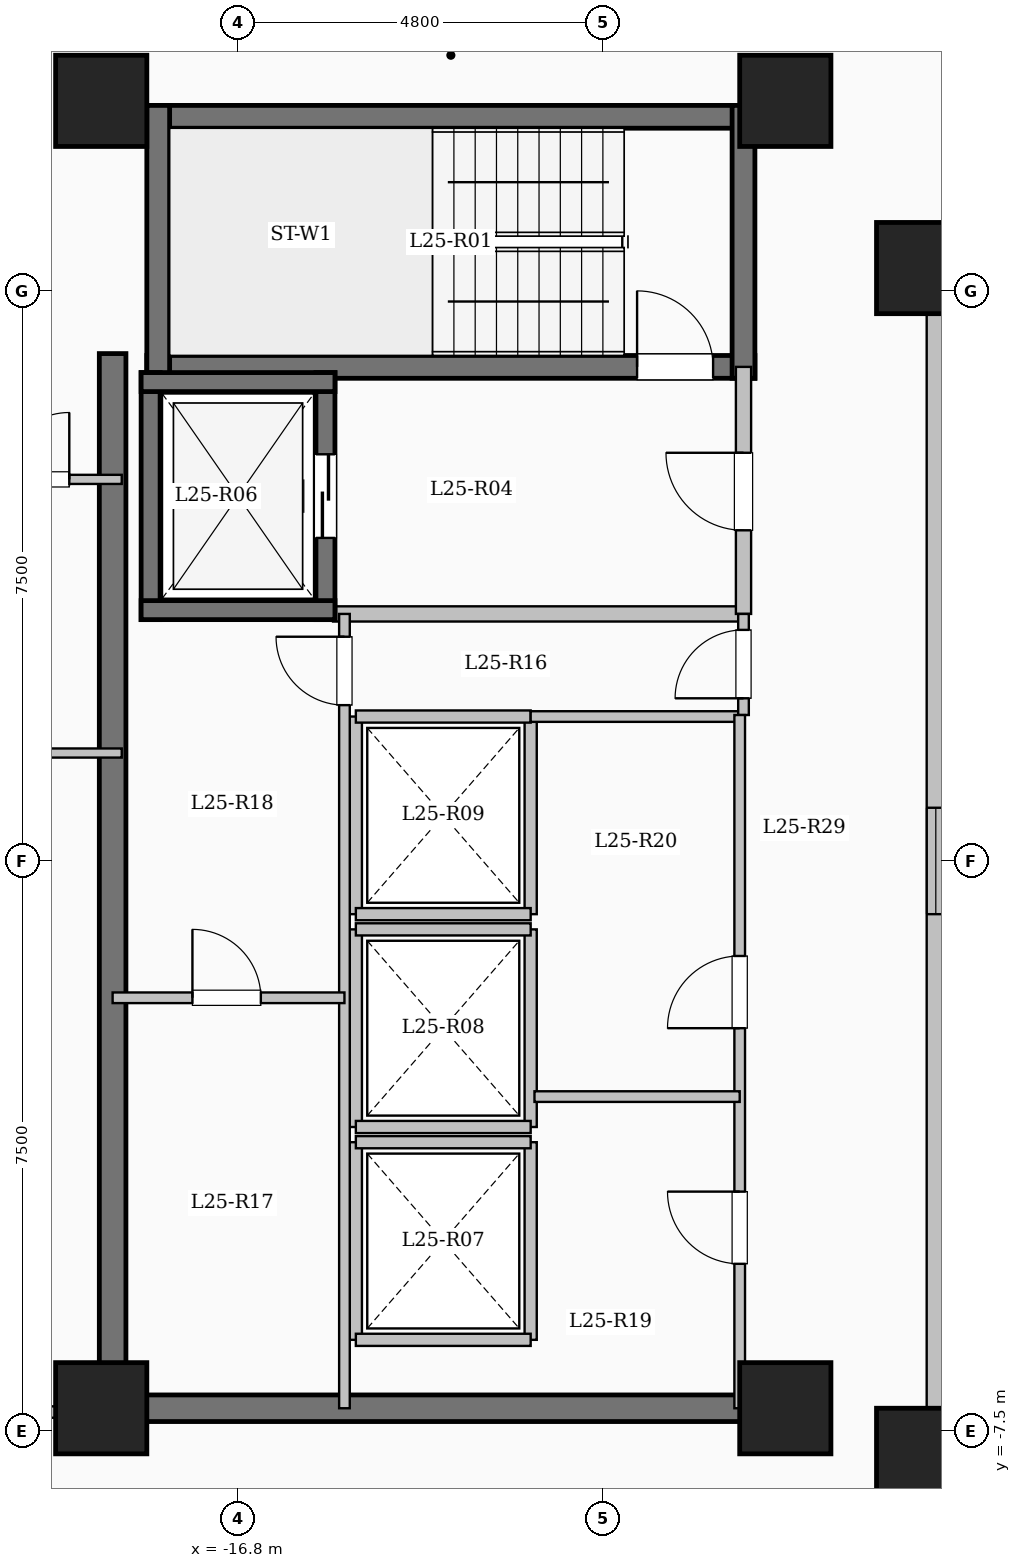
"""IFC4 building model, lengths in metres.
Left out: names, types, materials, properties, quantities, classifications, styles, units other than length and angle.
Written with IfcOpenShell. Run it as: python <this file> out.ifc"""

import sys

from ifc_helpers import new_model, si_unit, direction, frame, frame_2d, origin, origin_2d, place, context, subcontext, project, spatial, rectangle, extrude, element, fill, save


model = new_model("IFC4")
c1 = context("Model", 3, precision=1e-05, world=origin(), true_north=direction((0.0, 1.0)))
c2 = subcontext(c1, "Body", "Model", "MODEL_VIEW")
j1 = project(units=[si_unit("LENGTHUNIT", "METRE"), si_unit("PLANEANGLEUNIT", "RADIAN")], contexts=[c1])
p1 = place(None, origin())
s1 = spatial("IfcSite", under=j1, at=p1, CompositionType="ELEMENT")
p2 = place(p1, origin())
s2 = spatial("IfcBuilding", under=s1, at=p2, CompositionType="ELEMENT")
p3 = place(p2, frame((0.0, 0.0, 95.05)))
s3 = spatial("IfcBuildingStorey", under=s2, at=p3, CompositionType="ELEMENT", Elevation=95.05)
for number, where, z_axis, x_axis in (
    (1, (-7.8, -7.8, 0.0), (0.0, 0.0, 1.0), (1.0, 0.0, 0.0)),
    (2, (-7.8, 7.8, 0.0), (0.0, 0.0, 1.0), (1.0, 0.0, 0.0)),
    (3, (-9.6, -7.2, 0.0), (0.0, 0.0, 1.0), (1.0, 0.0, 0.0)),
    (4, (-9.6, 10.0, 0.0), (0.0, 0.0, 1.0), (1.0, 0.0, 0.0)),
    (5, (-18.6, -7.2, 0.0), (0.0, 0.0, 1.0), (1.0, 0.0, 0.0)),
    (6, (-18.6, 10.0, 0.0), (0.0, 0.0, 1.0), (1.0, 0.0, 0.0)),
):
    element("IfcColumn", number, at=place(p3, frame(where, z_axis=z_axis, x_axis=x_axis)), inside=s3, PredefinedType="COLUMN", context=c2, shape_type="SweptSolid", body=[
        extrude(rectangle(XDim=1.2, YDim=1.2, at=origin_2d()), origin(), (0.0, 0.0, 1.0), 3.35),
    ])
p4 = place(p3, frame((-7.62, -7.62, 0.0), z_axis=(0.0, 0.0, 1.0), x_axis=(1.0, 0.0, 0.0)))
e7 = element("IfcWall", 7, at=p4, inside=s3, PredefinedType="SOLIDWALL", context=c2, shape_type="SweptSolid", body=[
    extrude(rectangle(XDim=15.24, YDim=0.24, at=frame_2d((7.62, 0.0))), origin(), (0.0, 0.0, 1.0), 3.1),
])
p5 = place(p4, frame((6.92, 0.0, 0.95)))
e8 = element("IfcOpeningElement", 8, at=p5, cuts=e7, PredefinedType="OPENING", context=c2, shape_type="SweptSolid", body=[
    extrude(rectangle(XDim=1.4, YDim=1.5, at=frame_2d((0.7, 0.75))), frame((0.0, 0.13, 0.0), z_axis=(0.0, -1.0, 0.0), x_axis=(1.0, 0.0, 0.0)), (0.0, 0.0, 1.0), 0.26),
])
p6 = place(p3, frame((7.62, 7.62, 0.0), z_axis=(0.0, 0.0, 1.0), x_axis=(-1.0, 0.0, 0.0)))
e9 = element("IfcWall", 9, at=p6, inside=s3, PredefinedType="SOLIDWALL", context=c2, shape_type="SweptSolid", body=[
    extrude(rectangle(XDim=15.24, YDim=0.24, at=frame_2d((7.62, 0.0))), origin(), (0.0, 0.0, 1.0), 3.1),
])
p7 = place(p6, frame((6.92, 0.0, 0.95)))
e10 = element("IfcOpeningElement", 10, at=p7, cuts=e9, PredefinedType="OPENING", context=c2, shape_type="SweptSolid", body=[
    extrude(rectangle(XDim=1.4, YDim=1.5, at=frame_2d((0.7, 0.75))), frame((0.0, 0.13, 0.0), z_axis=(0.0, -1.0, 0.0), x_axis=(1.0, 0.0, 0.0)), (0.0, 0.0, 1.0), 0.26),
])
p8 = place(p3, frame((-7.62, 7.62, 0.0), z_axis=(0.0, 0.0, 1.0), x_axis=(0.0, -1.0, 0.0)))
e11 = element("IfcWall", 11, at=p8, inside=s3, PredefinedType="SOLIDWALL", context=c2, shape_type="SweptSolid", body=[
    extrude(rectangle(XDim=15.24, YDim=0.24, at=frame_2d((7.62, 0.0))), origin(), (0.0, 0.0, 1.0), 3.1),
])
p9 = place(p8, frame((6.92, 0.0, 0.95)))
e12 = element("IfcOpeningElement", 12, at=p9, cuts=e11, PredefinedType="OPENING", context=c2, shape_type="SweptSolid", body=[
    extrude(rectangle(XDim=1.4, YDim=1.5, at=frame_2d((0.7, 0.75))), frame((0.0, 0.13, 0.0), z_axis=(0.0, -1.0, 0.0), x_axis=(1.0, 0.0, 0.0)), (0.0, 0.0, 1.0), 0.26),
])
p10 = place(p3, frame((-18.0, 9.79, 0.0), z_axis=(0.0, 0.0, 1.0), x_axis=(1.0, 0.0, 0.0)))
e13 = element("IfcWall", 13, at=p10, inside=s3, PredefinedType="SHEAR", context=c2, shape_type="SweptSolid", body=[
    extrude(rectangle(XDim=8.0, YDim=0.3, at=frame_2d((4.0, 0.0))), origin(), (0.0, 0.0, 1.0), 3.35),
])
p11 = place(p3, frame((-18.0, 6.5, 0.0), z_axis=(0.0, 0.0, 1.0), x_axis=(1.0, 0.0, 0.0)))
e14 = element("IfcWall", 14, at=p11, inside=s3, PredefinedType="SHEAR", context=c2, shape_type="SweptSolid", body=[
    extrude(rectangle(XDim=8.0, YDim=0.3, at=frame_2d((4.0, 0.0))), origin(), (0.0, 0.0, 1.0), 3.35),
])
p12 = place(p11, frame((6.45, 0.0, 0.0)))
e15 = element("IfcOpeningElement", 15, at=p12, cuts=e14, PredefinedType="OPENING", context=c2, shape_type="SweptSolid", body=[
    extrude(rectangle(XDim=1.0, YDim=2.15, at=frame_2d((0.5, 1.075))), frame((0.0, 0.16, 0.0), z_axis=(0.0, -1.0, 0.0), x_axis=(1.0, 0.0, 0.0)), (0.0, 0.0, 1.0), 0.32),
])
for number, where, z_axis, x_axis in (
    (16, (-17.85, 6.35, 0.0), (0.0, 0.0, 1.0), (0.0, 1.0, 0.0)),
    (17, (-10.15, 6.35, 0.0), (0.0, 0.0, 1.0), (0.0, 1.0, 0.0)),
):
    element("IfcWall", number, at=place(p3, frame(where, z_axis=z_axis, x_axis=x_axis)), inside=s3, PredefinedType="SHEAR", context=c2, shape_type="SweptSolid", body=[
        extrude(rectangle(XDim=3.59, YDim=0.3, at=frame_2d((1.795, 0.0))), origin(), (0.0, 0.0, 1.0), 3.35),
    ])
p13 = place(p3, frame((-15.55, 3.25, 0.0), z_axis=(0.0, 0.0, 1.0), x_axis=(1.0, 0.0, 0.0)))
e18 = element("IfcWall", 18, at=p13, inside=s3, PredefinedType="SOLIDWALL", context=c2, shape_type="SweptSolid", body=[
    extrude(rectangle(XDim=5.4, YDim=0.2, at=frame_2d((2.7, 0.0))), origin(), (0.0, 0.0, 1.0), 3.1),
])
p14 = place(p3, frame((-10.15, 3.25, 0.0), z_axis=(0.0, 0.0, 1.0), x_axis=(0.0, 1.0, 0.0)))
e19 = element("IfcWall", 19, at=p14, inside=s3, PredefinedType="SOLIDWALL", context=c2, shape_type="SweptSolid", body=[
    extrude(rectangle(XDim=3.25, YDim=0.2, at=frame_2d((1.625, 0.0))), origin(), (0.0, 0.0, 1.0), 3.1),
])
p15 = place(p14, frame((1.1, 0.0, 0.0)))
e20 = element("IfcOpeningElement", 20, at=p15, cuts=e19, PredefinedType="OPENING", context=c2, shape_type="SweptSolid", body=[
    extrude(rectangle(XDim=1.02, YDim=2.15, at=frame_2d((0.51, 1.075))), frame((0.0, 0.11, 0.0), z_axis=(0.0, -1.0, 0.0), x_axis=(1.0, 0.0, 0.0)), (0.0, 0.0, 1.0), 0.22),
])
p16 = place(p3, frame((-17.95, 3.175, 0.0), z_axis=(0.0, 0.0, 1.0), x_axis=(0.0, 1.0, 0.0)))
e21 = element("IfcWall", 21, at=p16, inside=s3, PredefinedType="SHEAR", context=c2, shape_type="SweptSolid", body=[
    extrude(rectangle(XDim=3.25, YDim=0.25, at=frame_2d((1.625, 0.0))), origin(), (0.0, 0.0, 1.0), 3.35),
])
p17 = place(p3, frame((-15.65, 3.175, 0.0), z_axis=(0.0, 0.0, 1.0), x_axis=(0.0, 1.0, 0.0)))
e22 = element("IfcWall", 22, at=p17, inside=s3, PredefinedType="SHEAR", context=c2, shape_type="SweptSolid", body=[
    extrude(rectangle(XDim=3.25, YDim=0.25, at=frame_2d((1.625, 0.0))), origin(), (0.0, 0.0, 1.0), 3.35),
])
p18 = place(p17, frame((1.075, 0.0, 0.0)))
e23 = element("IfcOpeningElement", 23, at=p18, cuts=e22, PredefinedType="OPENING", context=c2, shape_type="SweptSolid", body=[
    extrude(rectangle(XDim=1.1, YDim=2.15, at=frame_2d((0.55, 1.075))), frame((0.0, 0.135, 0.0), z_axis=(0.0, -1.0, 0.0), x_axis=(1.0, 0.0, 0.0)), (0.0, 0.0, 1.0), 0.27),
])
for number, where, z_axis, x_axis in (
    (24, (-18.075, 3.3, 0.0), (0.0, 0.0, 1.0), (1.0, 0.0, 0.0)),
    (25, (-18.075, 6.3, 0.0), (0.0, 0.0, 1.0), (1.0, 0.0, 0.0)),
):
    element("IfcWall", number, at=place(p3, frame(where, z_axis=z_axis, x_axis=x_axis)), inside=s3, PredefinedType="SHEAR", context=c2, shape_type="SweptSolid", body=[
        extrude(rectangle(XDim=2.55, YDim=0.25, at=frame_2d((1.275, 0.0))), origin(), (0.0, 0.0, 1.0), 3.35),
    ])
for number, where, z_axis, x_axis in (
    (26, (-15.25, -6.3, 0.0), (0.0, 0.0, 1.0), (0.0, 1.0, 0.0)),
    (27, (-12.95, -6.3, 0.0), (0.0, 0.0, 1.0), (0.0, 1.0, 0.0)),
):
    element("IfcWall", number, at=place(p3, frame(where, z_axis=z_axis, x_axis=x_axis)), inside=s3, PredefinedType="SOLIDWALL", context=c2, shape_type="SweptSolid", body=[
        extrude(rectangle(XDim=2.6, YDim=0.16, at=frame_2d((1.3, 0.0))), origin(), (0.0, 0.0, 1.0), 3.1),
    ])
for number, where, z_axis, x_axis in (
    (28, (-15.25, -6.3, 0.0), (0.0, 0.0, 1.0), (1.0, 0.0, 0.0)),
    (29, (-15.25, -3.7, 0.0), (0.0, 0.0, 1.0), (1.0, 0.0, 0.0)),
):
    element("IfcWall", number, at=place(p3, frame(where, z_axis=z_axis, x_axis=x_axis)), inside=s3, PredefinedType="SOLIDWALL", context=c2, shape_type="SweptSolid", body=[
        extrude(rectangle(XDim=2.3, YDim=0.16, at=frame_2d((1.15, 0.0))), origin(), (0.0, 0.0, 1.0), 3.1),
    ])
for number, where, z_axis, x_axis in (
    (30, (-15.25, -3.5, 0.0), (0.0, 0.0, 1.0), (0.0, 1.0, 0.0)),
    (31, (-12.95, -3.5, 0.0), (0.0, 0.0, 1.0), (0.0, 1.0, 0.0)),
):
    element("IfcWall", number, at=place(p3, frame(where, z_axis=z_axis, x_axis=x_axis)), inside=s3, PredefinedType="SOLIDWALL", context=c2, shape_type="SweptSolid", body=[
        extrude(rectangle(XDim=2.6, YDim=0.16, at=frame_2d((1.3, 0.0))), origin(), (0.0, 0.0, 1.0), 3.1),
    ])
for number, where, z_axis, x_axis in (
    (32, (-15.25, -3.5, 0.0), (0.0, 0.0, 1.0), (1.0, 0.0, 0.0)),
    (33, (-15.25, -0.9, 0.0), (0.0, 0.0, 1.0), (1.0, 0.0, 0.0)),
):
    element("IfcWall", number, at=place(p3, frame(where, z_axis=z_axis, x_axis=x_axis)), inside=s3, PredefinedType="SOLIDWALL", context=c2, shape_type="SweptSolid", body=[
        extrude(rectangle(XDim=2.3, YDim=0.16, at=frame_2d((1.15, 0.0))), origin(), (0.0, 0.0, 1.0), 3.1),
    ])
for number, where, z_axis, x_axis in (
    (34, (-15.25, -0.7, 0.0), (0.0, 0.0, 1.0), (0.0, 1.0, 0.0)),
    (35, (-12.95, -0.7, 0.0), (0.0, 0.0, 1.0), (0.0, 1.0, 0.0)),
):
    element("IfcWall", number, at=place(p3, frame(where, z_axis=z_axis, x_axis=x_axis)), inside=s3, PredefinedType="SOLIDWALL", context=c2, shape_type="SweptSolid", body=[
        extrude(rectangle(XDim=2.6, YDim=0.16, at=frame_2d((1.3, 0.0))), origin(), (0.0, 0.0, 1.0), 3.1),
    ])
for number, where, z_axis, x_axis in (
    (36, (-15.25, -0.7, 0.0), (0.0, 0.0, 1.0), (1.0, 0.0, 0.0)),
    (37, (-15.25, 1.9, 0.0), (0.0, 0.0, 1.0), (1.0, 0.0, 0.0)),
):
    element("IfcWall", number, at=place(p3, frame(where, z_axis=z_axis, x_axis=x_axis)), inside=s3, PredefinedType="SOLIDWALL", context=c2, shape_type="SweptSolid", body=[
        extrude(rectangle(XDim=2.3, YDim=0.16, at=frame_2d((1.15, 0.0))), origin(), (0.0, 0.0, 1.0), 3.1),
    ])
p19 = place(p3, frame((-18.45, -7.375, 0.0), z_axis=(0.0, 0.0, 1.0), x_axis=(0.0, 1.0, 0.0)))
e38 = element("IfcWall", 38, at=p19, inside=s3, PredefinedType="SHEAR", context=c2, shape_type="SweptSolid", body=[
    extrude(rectangle(XDim=14.05, YDim=0.35, at=frame_2d((7.025, 0.0))), origin(), (0.0, 0.0, 1.0), 3.35),
])
p20 = place(p3, frame((-18.625, -7.2, 0.0), z_axis=(0.0, 0.0, 1.0), x_axis=(1.0, 0.0, 0.0)))
e39 = element("IfcWall", 39, at=p20, inside=s3, PredefinedType="SHEAR", context=c2, shape_type="SweptSolid", body=[
    extrude(rectangle(XDim=8.55, YDim=0.35, at=frame_2d((4.275, 0.0))), origin(), (0.0, 0.0, 1.0), 3.35),
])
p21 = place(p3, frame((-12.95, 1.9, 0.0), z_axis=(0.0, 0.0, 1.0), x_axis=(1.0, 0.0, 0.0)))
e40 = element("IfcWall", 40, at=p21, inside=s3, PredefinedType="PARTITIONING", context=c2, shape_type="SweptSolid", body=[
    extrude(rectangle(XDim=2.8, YDim=0.14, at=frame_2d((1.4, 0.0))), origin(), (0.0, 0.0, 1.0), 3.1),
])
p22 = place(p3, frame((-10.15, 1.92, 0.0), z_axis=(0.0, 0.0, 1.0), x_axis=(0.0, 1.0, 0.0)))
e41 = element("IfcWall", 41, at=p22, inside=s3, PredefinedType="PARTITIONING", context=c2, shape_type="SweptSolid", body=[
    extrude(rectangle(XDim=1.33, YDim=0.14, at=frame_2d((0.665, 0.0))), origin(), (0.0, 0.0, 1.0), 3.1),
])
p23 = place(p22, frame((0.22, 0.0, 0.0)))
e42 = element("IfcOpeningElement", 42, at=p23, cuts=e41, PredefinedType="OPENING", context=c2, shape_type="SweptSolid", body=[
    extrude(rectangle(XDim=0.9, YDim=2.08, at=frame_2d((0.45, 1.04))), frame((0.0, 0.08, 0.0), z_axis=(0.0, -1.0, 0.0), x_axis=(1.0, 0.0, 0.0)), (0.0, 0.0, 1.0), 0.16),
])
p24 = place(p3, frame((-15.4, -7.2, 0.0), z_axis=(0.0, 0.0, 1.0), x_axis=(0.0, 1.0, 0.0)))
e43 = element("IfcWall", 43, at=p24, inside=s3, PredefinedType="PARTITIONING", context=c2, shape_type="SweptSolid", body=[
    extrude(rectangle(XDim=10.45, YDim=0.14, at=frame_2d((5.225, 0.0))), origin(), (0.0, 0.0, 1.0), 3.1),
])
p25 = place(p24, frame((9.25, 0.0, 0.0)))
e44 = element("IfcOpeningElement", 44, at=p25, cuts=e43, PredefinedType="OPENING", context=c2, shape_type="SweptSolid", body=[
    extrude(rectangle(XDim=0.9, YDim=2.08, at=frame_2d((0.45, 1.04))), frame((0.0, 0.08, 0.0), z_axis=(0.0, -1.0, 0.0), x_axis=(1.0, 0.0, 0.0)), (0.0, 0.0, 1.0), 0.16),
])
p26 = place(p3, frame((-18.45, -1.8, 0.0), z_axis=(0.0, 0.0, 1.0), x_axis=(1.0, 0.0, 0.0)))
e45 = element("IfcWall", 45, at=p26, inside=s3, PredefinedType="PARTITIONING", context=c2, shape_type="SweptSolid", body=[
    extrude(rectangle(XDim=3.05, YDim=0.14, at=frame_2d((1.525, 0.0))), origin(), (0.0, 0.0, 1.0), 3.1),
])
p27 = place(p26, frame((1.05, 0.0, 0.0)))
e46 = element("IfcOpeningElement", 46, at=p27, cuts=e45, PredefinedType="OPENING", context=c2, shape_type="SweptSolid", body=[
    extrude(rectangle(XDim=0.9, YDim=2.08, at=frame_2d((0.45, 1.04))), frame((0.0, 0.08, 0.0), z_axis=(0.0, -1.0, 0.0), x_axis=(1.0, 0.0, 0.0)), (0.0, 0.0, 1.0), 0.16),
])
p28 = place(p3, frame((-10.2, -7.2, 0.0), z_axis=(0.0, 0.0, 1.0), x_axis=(0.0, 1.0, 0.0)))
e47 = element("IfcWall", 47, at=p28, inside=s3, PredefinedType="PARTITIONING", context=c2, shape_type="SweptSolid", body=[
    extrude(rectangle(XDim=9.12, YDim=0.14, at=frame_2d((4.56, 0.0))), origin(), (0.0, 0.0, 1.0), 3.1),
])
p29 = place(p28, frame((1.9, 0.0, 0.0)))
e48 = element("IfcOpeningElement", 48, at=p29, cuts=e47, PredefinedType="OPENING", context=c2, shape_type="SweptSolid", body=[
    extrude(rectangle(XDim=0.95, YDim=2.12, at=frame_2d((0.475, 1.06))), frame((0.0, 0.08, 0.0), z_axis=(0.0, -1.0, 0.0), x_axis=(1.0, 0.0, 0.0)), (0.0, 0.0, 1.0), 0.16),
])
p30 = place(p28, frame((5.0, 0.0, 0.0)))
e49 = element("IfcOpeningElement", 49, at=p30, cuts=e47, PredefinedType="OPENING", context=c2, shape_type="SweptSolid", body=[
    extrude(rectangle(XDim=0.95, YDim=2.12, at=frame_2d((0.475, 1.06))), frame((0.0, 0.08, 0.0), z_axis=(0.0, -1.0, 0.0), x_axis=(1.0, 0.0, 0.0)), (0.0, 0.0, 1.0), 0.16),
])
p31 = place(p3, frame((-12.9, -3.1, 0.0), z_axis=(0.0, 0.0, 1.0), x_axis=(1.0, 0.0, 0.0)))
e50 = element("IfcWall", 50, at=p31, inside=s3, PredefinedType="PARTITIONING", context=c2, shape_type="SweptSolid", body=[
    extrude(rectangle(XDim=2.7, YDim=0.14, at=frame_2d((1.35, 0.0))), origin(), (0.0, 0.0, 1.0), 3.1),
])
p32 = place(p3, frame((-26.88, -7.25, 0.0), z_axis=(0.0, 0.0, 1.0), x_axis=(1.0, 0.0, 0.0)))
e51 = element("IfcWall", 51, at=p32, inside=s3, PredefinedType="PARTITIONING", context=c2, shape_type="SweptSolid", body=[
    extrude(rectangle(XDim=8.43, YDim=0.15, at=frame_2d((4.215, 0.0))), origin(), (0.0, 0.0, 1.0), 3.1),
])
p33 = place(p32, frame((5.33, 0.0, 0.0)))
e52 = element("IfcOpeningElement", 52, at=p33, cuts=e51, PredefinedType="OPENING", context=c2, shape_type="SweptSolid", body=[
    extrude(rectangle(XDim=0.96, YDim=2.15, at=frame_2d((0.48, 1.075))), frame((0.0, 0.085, 0.0), z_axis=(0.0, -1.0, 0.0), x_axis=(1.0, 0.0, 0.0)), (0.0, 0.0, 1.0), 0.17),
])
p34 = place(p3, frame((-27.0, 1.42, 0.0), z_axis=(0.0, 0.0, 1.0), x_axis=(1.0, 0.0, 0.0)))
e53 = element("IfcWall", 53, at=p34, inside=s3, PredefinedType="PARTITIONING", context=c2, shape_type="SweptSolid", body=[
    extrude(rectangle(XDim=8.67, YDim=0.12, at=frame_2d((4.335, 0.0))), origin(), (0.0, 0.0, 1.0), 3.1),
])
p35 = place(p34, frame((1.763, 0.0, 0.0)))
e54 = element("IfcOpeningElement", 54, at=p35, cuts=e53, PredefinedType="OPENING", context=c2, shape_type="SweptSolid", body=[
    extrude(rectangle(XDim=0.88, YDim=2.1, at=frame_2d((0.44, 1.05))), frame((0.0, 0.07, 0.0), z_axis=(0.0, -1.0, 0.0), x_axis=(1.0, 0.0, 0.0)), (0.0, 0.0, 1.0), 0.14),
])
p36 = place(p34, frame((5.928, 0.0, 0.0)))
e55 = element("IfcOpeningElement", 55, at=p36, cuts=e53, PredefinedType="OPENING", context=c2, shape_type="SweptSolid", body=[
    extrude(rectangle(XDim=0.88, YDim=2.1, at=frame_2d((0.44, 1.05))), frame((0.0, 0.07, 0.0), z_axis=(0.0, -1.0, 0.0), x_axis=(1.0, 0.0, 0.0)), (0.0, 0.0, 1.0), 0.14),
])
p37 = place(p3, frame((-27.0, 5.02, 0.0), z_axis=(0.0, 0.0, 1.0), x_axis=(1.0, 0.0, 0.0)))
e56 = element("IfcWall", 56, at=p37, inside=s3, PredefinedType="PARTITIONING", context=c2, shape_type="SweptSolid", body=[
    extrude(rectangle(XDim=8.67, YDim=0.12, at=frame_2d((4.335, 0.0))), origin(), (0.0, 0.0, 1.0), 3.1),
])
p38 = place(p37, frame((7.1, 0.0, 0.0)))
e57 = element("IfcOpeningElement", 57, at=p38, cuts=e56, PredefinedType="OPENING", context=c2, shape_type="SweptSolid", body=[
    extrude(rectangle(XDim=0.88, YDim=2.1, at=frame_2d((0.44, 1.05))), frame((0.0, 0.07, 0.0), z_axis=(0.0, -1.0, 0.0), x_axis=(1.0, 0.0, 0.0)), (0.0, 0.0, 1.0), 0.14),
])
p39 = place(p9, origin())
e58 = element("IfcWindow", 58, at=p39, inside=s3, PartitioningType="SINGLE_PANEL", PredefinedType="WINDOW", context=c2, shape_type="SweptSolid", body=[
    extrude(rectangle(XDim=1.4, YDim=1.5, at=frame_2d((0.7, 0.75))), frame((0.0, 0.03, 0.0), z_axis=(0.0, -1.0, 0.0), x_axis=(1.0, 0.0, 0.0)), (0.0, 0.0, 1.0), 0.06),
])
fill(e12, e58)
p40 = place(p12, origin())
e59 = element("IfcDoor", 59, at=p40, inside=s3, OperationType="SINGLE_SWING_LEFT", PredefinedType="DOOR", context=c2, shape_type="SweptSolid", body=[
    extrude(rectangle(XDim=1.0, YDim=2.15, at=frame_2d((0.5, 1.075))), frame((0.0, 0.025, 0.0), z_axis=(0.0, -1.0, 0.0), x_axis=(1.0, 0.0, 0.0)), (0.0, 0.0, 1.0), 0.05),
])
fill(e15, e59)
p41 = place(p15, origin())
e60 = element("IfcDoor", 60, at=p41, inside=s3, OperationType="SINGLE_SWING_RIGHT", PredefinedType="DOOR", context=c2, shape_type="SweptSolid", body=[
    extrude(rectangle(XDim=1.02, YDim=2.15, at=frame_2d((0.51, 1.075))), frame((0.0, 0.025, 0.0), z_axis=(0.0, -1.0, 0.0), x_axis=(1.0, 0.0, 0.0)), (0.0, 0.0, 1.0), 0.05),
])
fill(e20, e60)
p42 = place(p18, origin())
e61 = element("IfcDoor", 61, at=p42, inside=s3, OperationType="SLIDING_TO_LEFT", PredefinedType="DOOR", context=c2, shape_type="SweptSolid", body=[
    extrude(rectangle(XDim=1.1, YDim=2.15, at=frame_2d((0.55, 1.075))), frame((0.0, 0.025, 0.0), z_axis=(0.0, -1.0, 0.0), x_axis=(1.0, 0.0, 0.0)), (0.0, 0.0, 1.0), 0.05),
])
fill(e23, e61)
p43 = place(p23, origin())
e62 = element("IfcDoor", 62, at=p43, inside=s3, OperationType="SINGLE_SWING_LEFT", PredefinedType="DOOR", context=c2, shape_type="SweptSolid", body=[
    extrude(rectangle(XDim=0.9, YDim=2.08, at=frame_2d((0.45, 1.04))), frame((0.0, 0.025, 0.0), z_axis=(0.0, -1.0, 0.0), x_axis=(1.0, 0.0, 0.0)), (0.0, 0.0, 1.0), 0.05),
])
fill(e42, e62)
p44 = place(p25, origin())
e63 = element("IfcDoor", 63, at=p44, inside=s3, OperationType="SINGLE_SWING_RIGHT", PredefinedType="DOOR", context=c2, shape_type="SweptSolid", body=[
    extrude(rectangle(XDim=0.9, YDim=2.08, at=frame_2d((0.45, 1.04))), frame((0.0, 0.025, 0.0), z_axis=(0.0, -1.0, 0.0), x_axis=(1.0, 0.0, 0.0)), (0.0, 0.0, 1.0), 0.05),
])
fill(e44, e63)
p45 = place(p27, origin())
e64 = element("IfcDoor", 64, at=p45, inside=s3, OperationType="SINGLE_SWING_LEFT", PredefinedType="DOOR", context=c2, shape_type="SweptSolid", body=[
    extrude(rectangle(XDim=0.9, YDim=2.08, at=frame_2d((0.45, 1.04))), frame((0.0, 0.025, 0.0), z_axis=(0.0, -1.0, 0.0), x_axis=(1.0, 0.0, 0.0)), (0.0, 0.0, 1.0), 0.05),
])
fill(e46, e64)
p46 = place(p29, origin())
e65 = element("IfcDoor", 65, at=p46, inside=s3, OperationType="SINGLE_SWING_RIGHT", PredefinedType="DOOR", context=c2, shape_type="SweptSolid", body=[
    extrude(rectangle(XDim=0.95, YDim=2.12, at=frame_2d((0.475, 1.06))), frame((0.0, 0.025, 0.0), z_axis=(0.0, -1.0, 0.0), x_axis=(1.0, 0.0, 0.0)), (0.0, 0.0, 1.0), 0.05),
])
fill(e48, e65)
p47 = place(p30, origin())
e66 = element("IfcDoor", 66, at=p47, inside=s3, OperationType="SINGLE_SWING_LEFT", PredefinedType="DOOR", context=c2, shape_type="SweptSolid", body=[
    extrude(rectangle(XDim=0.95, YDim=2.12, at=frame_2d((0.475, 1.06))), frame((0.0, 0.025, 0.0), z_axis=(0.0, -1.0, 0.0), x_axis=(1.0, 0.0, 0.0)), (0.0, 0.0, 1.0), 0.05),
])
fill(e49, e66)
p48 = place(p38, origin())
e67 = element("IfcDoor", 67, at=p48, inside=s3, OperationType="SINGLE_SWING_RIGHT", PredefinedType="DOOR", context=c2, shape_type="SweptSolid", body=[
    extrude(rectangle(XDim=0.88, YDim=2.1, at=frame_2d((0.44, 1.05))), frame((0.0, 0.025, 0.0), z_axis=(0.0, -1.0, 0.0), x_axis=(1.0, 0.0, 0.0)), (0.0, 0.0, 1.0), 0.05),
])
fill(e57, e67)
save(model, sys.argv[1])
